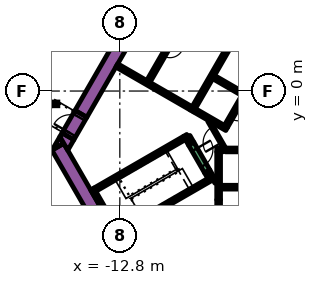
"""IFC4 building model, lengths in metres.
Left out: names, types, materials, properties, quantities, classifications, styles, units other than length and angle.
Written with IfcOpenShell. Run it as: python <this file> out.ifc"""

import sys

from ifc_helpers import new_model, si_unit, direction, frame, frame_2d, origin, origin_2d, place, context, subcontext, project, spatial, polyline, rectangle, outline, extrude, element, fill, save


model = new_model("IFC4")
c1 = context("Model", 3, precision=1e-05, world=origin(), true_north=direction((0.0, 1.0)))
c2 = subcontext(c1, "Body", "Model", "MODEL_VIEW")
j1 = project(units=[si_unit("LENGTHUNIT", "METRE"), si_unit("PLANEANGLEUNIT", "RADIAN")], contexts=[c1])
p1 = place(None, origin())
s1 = spatial("IfcSite", under=j1, at=p1, CompositionType="ELEMENT")
p2 = place(p1, origin())
s2 = spatial("IfcBuilding", under=s1, at=p2, CompositionType="ELEMENT")
p3 = place(p2, frame((0.0, 0.0, 11.4)))
s3 = spatial("IfcBuildingStorey", under=s2, at=p3, CompositionType="ELEMENT", Elevation=11.4)
p4 = place(p3, frame((-15.36, -1.503, 0.0), z_axis=(0.0, 0.0, 1.0), x_axis=(0.50000389221, 0.866023156604, 0.0)))
e1 = element("IfcWall", 1, at=p4, inside=s3, PredefinedType="SOLIDWALL", context=c2, shape_type="SweptSolid", body=[
    extrude(rectangle(XDim=21.0, YDim=0.9, at=frame_2d((10.5, 0.0))), origin(), (0.0, 0.0, 1.0), 4.8),
])
p5 = place(p3, frame((-12.134, -11.883, 0.0), z_axis=(0.0, 0.0, 1.0), x_axis=(-0.500005339912, 0.866022320763, 0.0)))
e2 = element("IfcWall", 2, at=p5, inside=s3, PredefinedType="SOLIDWALL", context=c2, shape_type="SweptSolid", body=[
    extrude(rectangle(XDim=9.488, YDim=0.9, at=frame_2d((4.744, 0.0))), origin(), (0.0, 0.0, 1.0), 4.8),
])
p6 = place(p3, origin())
e3 = element("IfcWall", 3, at=p6, inside=s3, PredefinedType="SOLIDWALL", context=c2, shape_type="SweptSolid", body=[
    extrude(outline(polyline([(-16.489, -3.44), (-17.251, -3.88), (-16.743, -3.0), (-16.489, -3.44)])), origin(), (0.0, 0.0, 1.0), 4.8),
])
e4 = element("IfcWall", 4, at=p6, inside=s3, PredefinedType="SOLIDWALL", context=c2, shape_type="SweptSolid", body=[
    extrude(outline(polyline([(-15.82, -3.201), (-16.223, -3.9), (-16.743, -3.0), (-16.599, -2.751), (-15.82, -3.201)])), origin(), (0.0, 0.0, 1.0), 4.8),
])
p7 = place(p3, frame((-12.885, -9.431, 0.0), z_axis=(0.0, 0.0, 1.0), x_axis=(-0.500020560727, 0.866013532718, 0.0)))
e5 = element("IfcWall", 5, at=p7, inside=s3, PredefinedType="SOLIDWALL", context=c2, shape_type="SweptSolid", body=[
    extrude(rectangle(XDim=3.45, YDim=0.25, at=frame_2d((1.725, 0.0))), origin(), (0.0, 0.0, 1.0), 4.8),
])
p8 = place(p3, frame((-14.44, -6.49, 0.0), z_axis=(0.0, 0.0, 1.0), x_axis=(0.866022966069, 0.500004222222, 0.0)))
e6 = element("IfcWall", 6, at=p8, inside=s3, PredefinedType="SOLIDWALL", context=c2, shape_type="SweptSolid", body=[
    extrude(rectangle(XDim=6.8, YDim=0.25, at=frame_2d((3.4, 0.0))), origin(), (0.0, 0.0, 1.0), 4.8),
])
p9 = place(p3, frame((-8.168, -3.503, 0.0), z_axis=(0.0, 0.0, 1.0), x_axis=(-0.499952099219, 0.866053057547, 0.0)))
e7 = element("IfcWall", 7, at=p9, inside=s3, PredefinedType="SOLIDWALL", context=c2, shape_type="SweptSolid", body=[
    extrude(rectangle(XDim=0.675, YDim=0.25, at=frame_2d((0.337, 0.0))), origin(), (0.0, 0.0, 1.0), 4.8),
])
p10 = place(p3, frame((-12.84, -9.261, 0.0), z_axis=(0.0, 0.0, 1.0), x_axis=(0.866016039709, 0.500016218704, 0.0)))
e8 = element("IfcWall", 8, at=p10, inside=s3, PredefinedType="SOLIDWALL", context=c2, shape_type="SweptSolid", body=[
    extrude(rectangle(XDim=7.05, YDim=0.25, at=frame_2d((3.525, 0.0))), origin(), (0.0, 0.0, 1.0), 4.8),
])
p11 = place(p3, frame((-6.905, -5.69, 0.0), z_axis=(0.0, 0.0, 1.0), x_axis=(-0.500402024738, 0.865793170242, 0.0)))
e9 = element("IfcWall", 9, at=p11, inside=s3, PredefinedType="SOLIDWALL", context=c2, shape_type="SweptSolid", body=[
    extrude(rectangle(XDim=0.425, YDim=0.25, at=frame_2d((0.212, 0.0))), origin(), (0.0, 0.0, 1.0), 4.8),
])
p12 = place(p3, frame((-5.845, -3.875, 0.0), z_axis=(0.0, 0.0, 1.0), x_axis=(1.0, 0.0, 0.0)))
e10 = element("IfcWall", 10, at=p12, inside=s3, PredefinedType="SOLIDWALL", context=c2, shape_type="SweptSolid", body=[
    extrude(rectangle(XDim=12.27, YDim=0.25, at=frame_2d((6.135, 0.0))), origin(), (0.0, 0.0, 1.0), 4.8),
])
p13 = place(p3, frame((-6.425, -3.875, 0.0), z_axis=(0.0, 0.0, 1.0), x_axis=(1.0, 0.0, 0.0)))
e11 = element("IfcWall", 11, at=p13, inside=s3, PredefinedType="SOLIDWALL", context=c2, shape_type="SweptSolid", body=[
    extrude(rectangle(XDim=0.428, YDim=0.25, at=frame_2d((0.214, 0.0))), origin(), (0.0, 0.0, 1.0), 4.8),
])
p14 = place(p3, frame((-6.3, -4.0, 0.0), z_axis=(0.0, 0.0, 1.0), x_axis=(0.0, -1.0, 0.0)))
e12 = element("IfcWall", 12, at=p14, inside=s3, PredefinedType="SOLIDWALL", context=c2, shape_type="SweptSolid", body=[
    extrude(rectangle(XDim=3.154, YDim=0.25, at=frame_2d((1.577, 0.0))), origin(), (0.0, 0.0, 1.0), 4.8),
])
p15 = place(p3, frame((-8.06, -1.311, 0.0), z_axis=(0.0, 0.0, 1.0), x_axis=(0.50000273126, 0.866023826885, 0.0)))
e13 = element("IfcWall", 13, at=p15, inside=s3, PredefinedType="SOLIDWALL", context=c2, shape_type="SweptSolid", body=[
    extrude(rectangle(XDim=10.33, YDim=0.25, at=frame_2d((5.165, 0.0))), origin(), (0.0, 0.0, 1.0), 4.8),
])
for number, where, z_axis, x_axis in (
    (14, (-5.369, 3.1, 0.0), (0.0, 0.0, 1.0), (0.866, -0.5, 0.0)),
    (15, (-4.724, -0.182, 0.0), (0.0, 0.0, 1.0), (-0.866, 0.5, 0.0)),
):
    element("IfcWall", number, at=place(p3, frame(where, z_axis=z_axis, x_axis=x_axis)), inside=s3, PredefinedType="SOLIDWALL", context=c2, shape_type="SweptSolid", body=[
        extrude(rectangle(XDim=2.2, YDim=0.25, at=frame_2d((1.1, 0.0))), origin(), (0.0, 0.0, 1.0), 4.8),
    ])
e16 = element("IfcWall", 16, at=p6, inside=s3, PredefinedType="SOLIDWALL", context=c2, shape_type="SweptSolid", body=[
    extrude(outline(polyline([(-5.922, -2.257), (-5.922, -2.257), (-5.705, -2.382), (-5.83, -2.598), (-6.829, -2.021), (-6.88, -1.934), (-6.88, -1.934), (-6.93, -1.963), (-7.952, -1.373), (-7.827, -1.156), (-5.922, -2.257)])), origin(), (0.0, 0.0, 1.0), 4.8),
])
p16 = place(p3, frame((-8.106, -1.14, 0.0), z_axis=(0.0, 0.0, 1.0), x_axis=(-0.866000643155, 0.500042884217, 0.0)))
e17 = element("IfcWall", 17, at=p16, inside=s3, PredefinedType="SOLIDWALL", context=c2, shape_type="SweptSolid", body=[
    extrude(rectangle(XDim=5.65, YDim=0.25, at=frame_2d((2.825, 0.0))), origin(), (0.0, 0.0, 1.0), 4.8),
])
p17 = place(p3, frame((-6.48, -6.027, 0.0), z_axis=(0.0, 0.0, 1.0), x_axis=(-0.499927229454, 0.866067413802, 0.0)))
e18 = element("IfcWall", 18, at=p17, inside=s3, PredefinedType="PARTITIONING", context=c2, shape_type="SweptSolid", body=[
    extrude(rectangle(XDim=0.929, YDim=0.15, at=frame_2d((0.464, 0.0))), origin(), (0.0, 0.0, 1.0), 4.8),
])
p18 = place(p3, frame((-8.252, -2.958, 0.0), z_axis=(0.0, 0.0, 1.0), x_axis=(0.500174715838, -0.865924508047, 0.0)))
e19 = element("IfcWall", 19, at=p18, inside=s3, PredefinedType="PARTITIONING", context=c2, shape_type="SweptSolid", body=[
    extrude(rectangle(XDim=0.514, YDim=0.15, at=frame_2d((0.257, 0.0))), origin(), (0.0, 0.0, 1.0), 3.9),
])
p19 = place(p3, frame((-6.175, -6.325, 0.0), z_axis=(0.0, 0.0, 1.0), x_axis=(1.0, 0.0, 0.0)))
e20 = element("IfcWall", 20, at=p19, inside=s3, PredefinedType="SOLIDWALL", context=c2, shape_type="SweptSolid", body=[
    extrude(rectangle(XDim=12.35, YDim=0.25, at=frame_2d((6.175, 0.0))), origin(), (0.0, 0.0, 1.0), 4.8),
])
p20 = place(p19, frame((3.205, 0.0, 0.0)))
e21 = element("IfcOpeningElement", 21, at=p20, cuts=e20, PredefinedType="OPENING", context=c2, shape_type="SweptSolid", body=[
    extrude(rectangle(XDim=0.9, YDim=2.1, at=frame_2d((0.45, 1.05))), frame((0.0, 0.135, 0.0), z_axis=(0.0, -1.0, 0.0), x_axis=(1.0, 0.0, 0.0)), (0.0, 0.0, 1.0), 0.27),
])
p21 = place(p19, frame((8.145, 0.0, 0.0)))
e22 = element("IfcOpeningElement", 22, at=p21, cuts=e20, PredefinedType="OPENING", context=c2, shape_type="SweptSolid", body=[
    extrude(rectangle(XDim=1.1, YDim=2.1, at=frame_2d((0.55, 1.05))), frame((0.0, 0.135, 0.0), z_axis=(0.0, -1.0, 0.0), x_axis=(1.0, 0.0, 0.0)), (0.0, 0.0, 1.0), 0.27),
])
p22 = place(p19, frame((10.665, 0.0, 0.0)))
e23 = element("IfcOpeningElement", 23, at=p22, cuts=e20, PredefinedType="OPENING", context=c2, shape_type="SweptSolid", body=[
    extrude(rectangle(XDim=1.1, YDim=2.1, at=frame_2d((0.55, 1.05))), frame((0.0, 0.135, 0.0), z_axis=(0.0, -1.0, 0.0), x_axis=(1.0, 0.0, 0.0)), (0.0, 0.0, 1.0), 0.27),
])
p23 = place(p3, frame((-6.008, 9.144, 0.0), z_axis=(0.0, 0.0, 1.0), x_axis=(-0.500006956611, -0.866021387346, 0.0)))
e24 = element("IfcWall", 24, at=p23, inside=s3, PredefinedType="SOLIDWALL", context=c2, shape_type="SweptSolid", body=[
    extrude(rectangle(XDim=9.83, YDim=0.25, at=frame_2d((4.915, 0.0))), origin(), (0.0, 0.0, 1.0), 4.8),
])
p24 = place(p23, frame((6.985, 0.0, 0.0)))
e25 = element("IfcOpeningElement", 25, at=p24, cuts=e24, PredefinedType="OPENING", context=c2, shape_type="SweptSolid", body=[
    extrude(rectangle(XDim=0.9, YDim=2.1, at=frame_2d((0.45, 1.05))), frame((0.0, 0.135, 0.0), z_axis=(0.0, -1.0, 0.0), x_axis=(1.0, 0.0, 0.0)), (0.0, 0.0, 1.0), 0.27),
])
p25 = place(p3, frame((-0.898, 6.194, 0.0), z_axis=(0.0, 0.0, 1.0), x_axis=(-0.499996202215, -0.866027596426, 0.0)))
e26 = element("IfcWall", 26, at=p25, inside=s3, PredefinedType="SOLIDWALL", context=c2, shape_type="SweptSolid", body=[
    extrude(rectangle(XDim=9.83, YDim=0.25, at=frame_2d((4.915, 0.0))), origin(), (0.0, 0.0, 1.0), 4.8),
])
p26 = place(p25, frame((0.585, 0.0, 0.0)))
e27 = element("IfcOpeningElement", 27, at=p26, cuts=e26, PredefinedType="OPENING", context=c2, shape_type="SweptSolid", body=[
    extrude(rectangle(XDim=1.1, YDim=2.1, at=frame_2d((0.55, 1.05))), frame((0.0, 0.135, 0.0), z_axis=(0.0, -1.0, 0.0), x_axis=(1.0, 0.0, 0.0)), (0.0, 0.0, 1.0), 0.27),
])
p27 = place(p25, frame((3.105, 0.0, 0.0)))
e28 = element("IfcOpeningElement", 28, at=p27, cuts=e26, PredefinedType="OPENING", context=c2, shape_type="SweptSolid", body=[
    extrude(rectangle(XDim=1.1, YDim=2.1, at=frame_2d((0.55, 1.05))), frame((0.0, 0.135, 0.0), z_axis=(0.0, -1.0, 0.0), x_axis=(1.0, 0.0, 0.0)), (0.0, 0.0, 1.0), 0.27),
])
p28 = place(p25, frame((5.625, 0.0, 0.0)))
e29 = element("IfcOpeningElement", 29, at=p28, cuts=e26, PredefinedType="OPENING", context=c2, shape_type="SweptSolid", body=[
    extrude(rectangle(XDim=1.1, YDim=2.1, at=frame_2d((0.55, 1.05))), frame((0.0, 0.135, 0.0), z_axis=(0.0, -1.0, 0.0), x_axis=(1.0, 0.0, 0.0)), (0.0, 0.0, 1.0), 0.27),
])
p29 = place(p25, frame((8.145, 0.0, 0.0)))
e30 = element("IfcOpeningElement", 30, at=p29, cuts=e26, PredefinedType="OPENING", context=c2, shape_type="SweptSolid", body=[
    extrude(rectangle(XDim=1.1, YDim=2.1, at=frame_2d((0.55, 1.05))), frame((0.0, 0.135, 0.0), z_axis=(0.0, -1.0, 0.0), x_axis=(1.0, 0.0, 0.0)), (0.0, 0.0, 1.0), 0.27),
])
p30 = place(p3, frame((-8.103, -3.466, 0.0), z_axis=(0.0, 0.0, 1.0), x_axis=(0.500078061341, -0.865980330357, 0.0)))
e31 = element("IfcWall", 31, at=p30, inside=s3, PredefinedType="SOLIDWALL", context=c2, shape_type="SweptSolid", body=[
    extrude(rectangle(XDim=2.1, YDim=0.4, at=frame_2d((1.05, 0.0))), origin(), (0.0, 0.0, 1.0), 4.8),
])
p31 = place(p30, frame((0.45, 0.0, 0.0)))
e32 = element("IfcOpeningElement", 32, at=p31, cuts=e31, PredefinedType="OPENING", context=c2, shape_type="SweptSolid", body=[
    extrude(rectangle(XDim=1.2, YDim=2.1, at=frame_2d((0.6, 1.05))), frame((0.0, 0.21, 0.0), z_axis=(0.0, -1.0, 0.0), x_axis=(1.0, 0.0, 0.0)), (0.0, 0.0, 1.0), 0.42),
])
p32 = place(p3, frame((-6.3, -7.154, 0.0), z_axis=(0.0, 0.0, 1.0), x_axis=(0.0, -1.0, 0.0)))
e33 = element("IfcWall", 33, at=p32, inside=s3, PredefinedType="SOLIDWALL", context=c2, shape_type="SweptSolid", body=[
    extrude(rectangle(XDim=1.8, YDim=0.25, at=frame_2d((0.9, 0.0))), origin(), (0.0, 0.0, 1.0), 4.8),
])
p33 = place(p32, frame((0.45, 0.0, 0.0)))
e34 = element("IfcOpeningElement", 34, at=p33, cuts=e33, PredefinedType="OPENING", context=c2, shape_type="SweptSolid", body=[
    extrude(rectangle(XDim=0.9, YDim=2.1, at=frame_2d((0.45, 1.05))), frame((0.0, 0.135, 0.0), z_axis=(0.0, -1.0, 0.0), x_axis=(1.0, 0.0, 0.0)), (0.0, 0.0, 1.0), 0.27),
])
p34 = place(p3, frame((-5.895, -3.79, 0.0), z_axis=(0.0, 0.0, 1.0), x_axis=(-0.49994051562, 0.866059744384, 0.0)))
e35 = element("IfcWall", 35, at=p34, inside=s3, PredefinedType="PARTITIONING", context=c2, shape_type="SweptSolid", body=[
    extrude(rectangle(XDim=2.1, YDim=0.15, at=frame_2d((1.05, 0.0))), origin(), (0.0, 0.0, 1.0), 3.9),
])
p35 = place(p34, frame((0.45, 0.0, 0.0)))
e36 = element("IfcOpeningElement", 36, at=p35, cuts=e35, PredefinedType="OPENING", context=c2, shape_type="SweptSolid", body=[
    extrude(rectangle(XDim=1.2, YDim=2.1, at=frame_2d((0.6, 1.05))), frame((0.0, 0.085, 0.0), z_axis=(0.0, -1.0, 0.0), x_axis=(1.0, 0.0, 0.0)), (0.0, 0.0, 1.0), 0.17),
])
p36 = place(p3, frame((-16.209, -2.976, 0.0), z_axis=(0.0, 0.0, 1.0), x_axis=(0.499954529098, 0.86605165483, 0.0)))
e37 = element("IfcWall", 37, at=p36, inside=s3, PredefinedType="SOLIDWALL", context=c2, shape_type="SweptSolid", body=[
    extrude(rectangle(XDim=1.7, YDim=0.9, at=frame_2d((0.85, 0.0))), origin(), (0.0, 0.0, 1.0), 4.8),
])
p37 = place(p36, frame((0.25, 0.0, 0.0)))
e38 = element("IfcOpeningElement", 38, at=p37, cuts=e37, PredefinedType="OPENING", context=c2, shape_type="SweptSolid", body=[
    extrude(rectangle(XDim=1.2, YDim=2.1, at=frame_2d((0.6, 1.05))), frame((0.0, 0.46, 0.0), z_axis=(0.0, -1.0, 0.0), x_axis=(1.0, 0.0, 0.0)), (0.0, 0.0, 1.0), 0.92),
])
p38 = place(p3, frame((-17.0, -0.845, 0.0), z_axis=(0.0, 0.0, 1.0), x_axis=(1.0, 0.0, 0.0)))
e39 = element("IfcColumn", 39, at=p38, inside=s3, PredefinedType="COLUMN", context=c2, shape_type="SweptSolid", body=[
    extrude(rectangle(XDim=0.25, YDim=0.25, at=origin_2d()), origin(), (0.0, 0.0, 1.0), 4.6),
])
p39 = place(p24, origin())
e40 = element("IfcDoor", 40, at=p39, inside=s3, OperationType="SINGLE_SWING_LEFT", PredefinedType="DOOR", context=c2, shape_type="SweptSolid", body=[
    extrude(rectangle(XDim=0.9, YDim=2.1, at=frame_2d((0.45, 1.05))), frame((0.0, 0.025, 0.0), z_axis=(0.0, -1.0, 0.0), x_axis=(1.0, 0.0, 0.0)), (0.0, 0.0, 1.0), 0.05),
])
fill(e25, e40)
p40 = place(p29, origin())
e41 = element("IfcDoor", 41, at=p40, inside=s3, OperationType="DOUBLE_DOOR_SLIDING", PredefinedType="DOOR", context=c2, shape_type="SweptSolid", body=[
    extrude(rectangle(XDim=1.1, YDim=2.1, at=frame_2d((0.55, 1.05))), frame((0.0, 0.025, 0.0), z_axis=(0.0, -1.0, 0.0), x_axis=(1.0, 0.0, 0.0)), (0.0, 0.0, 1.0), 0.05),
])
fill(e30, e41)
p41 = place(p31, origin())
e42 = element("IfcDoor", 42, at=p41, inside=s3, OperationType="SINGLE_SWING_LEFT", PredefinedType="DOOR", context=c2, shape_type="SweptSolid", body=[
    extrude(rectangle(XDim=1.2, YDim=2.1, at=frame_2d((0.6, 1.05))), frame((0.0, 0.025, 0.0), z_axis=(0.0, -1.0, 0.0), x_axis=(1.0, 0.0, 0.0)), (0.0, 0.0, 1.0), 0.05),
])
fill(e32, e42)
p42 = place(p35, origin())
e43 = element("IfcDoor", 43, at=p42, inside=s3, OperationType="SINGLE_SWING_LEFT", PredefinedType="DOOR", context=c2, shape_type="SweptSolid", body=[
    extrude(rectangle(XDim=1.2, YDim=2.1, at=frame_2d((0.6, 1.05))), frame((0.0, 0.025, 0.0), z_axis=(0.0, -1.0, 0.0), x_axis=(1.0, 0.0, 0.0)), (0.0, 0.0, 1.0), 0.05),
])
fill(e36, e43)
p43 = place(p37, origin())
e44 = element("IfcDoor", 44, at=p43, inside=s3, OperationType="SINGLE_SWING_LEFT", PredefinedType="DOOR", context=c2, shape_type="SweptSolid", body=[
    extrude(rectangle(XDim=1.2, YDim=2.1, at=frame_2d((0.6, 1.05))), frame((0.0, 0.025, 0.0), z_axis=(0.0, -1.0, 0.0), x_axis=(1.0, 0.0, 0.0)), (0.0, 0.0, 1.0), 0.05),
])
fill(e38, e44)
save(model, sys.argv[1])
